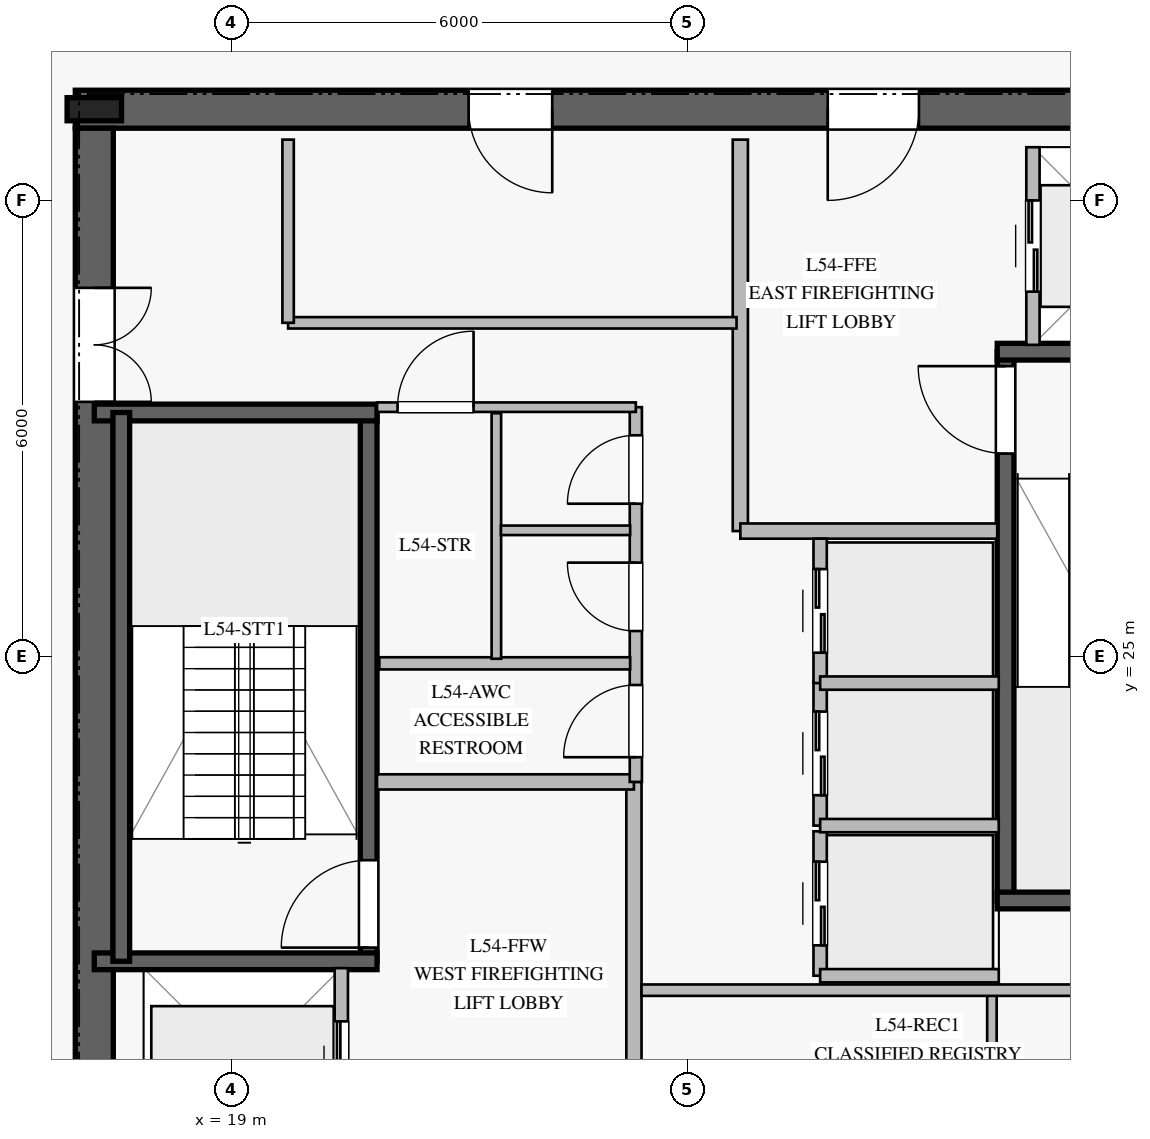
"""IFC4 building model, lengths in metres.
Left out: names, types, materials, properties, quantities, classifications, styles, units other than length and angle.
Written with IfcOpenShell. Run it as: python <this file> out.ifc"""

import sys

from ifc_helpers import new_model, si_unit, direction, frame, frame_2d, origin, origin_2d, place, context, subcontext, project, spatial, rectangle, i_section, extrude, element, fill, save


model = new_model("IFC4")
c1 = context("Model", 3, precision=1e-05, world=origin(), true_north=direction((0.0, 1.0)))
c2 = subcontext(c1, "Body", "Model", "MODEL_VIEW")
j1 = project(units=[si_unit("LENGTHUNIT", "METRE"), si_unit("PLANEANGLEUNIT", "RADIAN")], contexts=[c1])
p1 = place(None, origin())
s1 = spatial("IfcSite", under=j1, at=p1, CompositionType="ELEMENT")
p2 = place(p1, origin())
s2 = spatial("IfcBuilding", under=s1, at=p2, CompositionType="ELEMENT")
p3 = place(p2, frame((0.0, 0.0, 224.8)))
s3 = spatial("IfcBuildingStorey", under=s2, at=p3, CompositionType="ELEMENT", Elevation=224.8)
p4 = place(p3, frame((33.05, 32.2, 0.0), z_axis=(0.0, 0.0, 1.0), x_axis=(-1.0, 0.0, 0.0)))
e1 = element("IfcWall", 1, at=p4, inside=s3, PredefinedType="SHEAR", context=c2, shape_type="SweptSolid", body=[
    extrude(rectangle(XDim=16.1, YDim=0.5, at=frame_2d((8.05, 0.0))), origin(), (0.0, 0.0, 1.0), 3.78),
])
p5 = place(p4, frame((5.0, 0.0, 0.0)))
e2 = element("IfcOpeningElement", 2, at=p5, cuts=e1, PredefinedType="OPENING", context=c2, shape_type="SweptSolid", body=[
    extrude(rectangle(XDim=1.2, YDim=2.25, at=frame_2d((0.6, 1.125))), frame((0.0, 0.26, 0.0), z_axis=(0.0, -1.0, 0.0), x_axis=(1.0, 0.0, 0.0)), (0.0, 0.0, 1.0), 0.52),
])
p6 = place(p4, frame((9.825, 0.0, 0.0)))
e3 = element("IfcOpeningElement", 3, at=p6, cuts=e1, PredefinedType="OPENING", context=c2, shape_type="SweptSolid", body=[
    extrude(rectangle(XDim=1.1, YDim=2.2, at=frame_2d((0.55, 1.1))), frame((0.0, 0.26, 0.0), z_axis=(0.0, -1.0, 0.0), x_axis=(1.0, 0.0, 0.0)), (0.0, 0.0, 1.0), 0.52),
])
p7 = place(p3, frame((17.2, 31.95, 0.0), z_axis=(0.0, 0.0, 1.0), x_axis=(0.0, -1.0, 0.0)))
e4 = element("IfcWall", 4, at=p7, inside=s3, PredefinedType="SHEAR", context=c2, shape_type="SweptSolid", body=[
    extrude(rectangle(XDim=13.9, YDim=0.5, at=frame_2d((6.95, 0.0))), origin(), (0.0, 0.0, 1.0), 3.78),
])
p8 = place(p7, frame((2.1, 0.0, 0.0)))
e5 = element("IfcOpeningElement", 5, at=p8, cuts=e4, PredefinedType="OPENING", context=c2, shape_type="SweptSolid", body=[
    extrude(rectangle(XDim=1.5, YDim=2.2, at=frame_2d((0.75, 1.1))), frame((0.0, 0.26, 0.0), z_axis=(0.0, -1.0, 0.0), x_axis=(1.0, 0.0, 0.0)), (0.0, 0.0, 1.0), 0.52),
])
p9 = place(p3, frame((17.2, 32.2, 0.0), z_axis=(0.0, 0.0, 1.0), x_axis=(1.0, 0.0, 0.0)))
e6 = element("IfcColumn", 6, at=p9, inside=s3, PredefinedType="COLUMN", context=c2, shape_type="SweptSolid", body=[
    extrude(i_section(OverallWidth=0.304, OverallDepth=0.716, WebThickness=0.021, FlangeThickness=0.04, at=origin_2d()), origin(), (0.0, 0.0, 1.0), 4.0),
])
p10 = place(p3, frame((20.81, 20.99, 0.0), z_axis=(0.0, 0.0, 1.0), x_axis=(0.0, 1.0, 0.0)))
e7 = element("IfcWall", 7, at=p10, inside=s3, PredefinedType="SOLIDWALL", context=c2, shape_type="SweptSolid", body=[
    extrude(rectangle(XDim=7.22, YDim=0.22, at=frame_2d((3.61, 0.0))), origin(), (0.0, 0.0, 1.0), 3.78),
])
p11 = place(p10, frame((0.18, 0.0, 0.0)))
e8 = element("IfcOpeningElement", 8, at=p11, cuts=e7, PredefinedType="OPENING", context=c2, shape_type="SweptSolid", body=[
    extrude(rectangle(XDim=1.15, YDim=2.2, at=frame_2d((0.575, 1.1))), frame((0.0, 0.12, 0.0), z_axis=(0.0, -1.0, 0.0), x_axis=(1.0, 0.0, 0.0)), (0.0, 0.0, 1.0), 0.24),
])
for number, where, z_axis, x_axis in (
    (9, (17.2, 20.99, 0.0), (0.0, 0.0, 1.0), (1.0, 0.0, 0.0)),
    (10, (17.2, 28.21, 0.0), (0.0, 0.0, 1.0), (1.0, 0.0, 0.0)),
):
    element("IfcWall", number, at=place(p3, frame(where, z_axis=z_axis, x_axis=x_axis)), inside=s3, PredefinedType="SOLIDWALL", context=c2, shape_type="SweptSolid", body=[
        extrude(rectangle(XDim=3.72, YDim=0.22, at=frame_2d((1.86, 0.0))), origin(), (0.0, 0.0, 1.0), 3.78),
    ])
p12 = place(p3, frame((17.555, 28.21, 0.0), z_axis=(0.0, 0.0, 1.0), x_axis=(0.0, -1.0, 0.0)))
e11 = element("IfcWall", 11, at=p12, inside=s3, PredefinedType="SOLIDWALL", context=c2, shape_type="SweptSolid", body=[
    extrude(rectangle(XDim=7.22, YDim=0.22, at=frame_2d((3.61, 0.0))), origin(), (0.0, 0.0, 1.0), 3.78),
])
p13 = place(p3, frame((29.19, 21.79, 0.0), z_axis=(0.0, 0.0, 1.0), x_axis=(0.0, 1.0, 0.0)))
e12 = element("IfcWall", 12, at=p13, inside=s3, PredefinedType="SOLIDWALL", context=c2, shape_type="SweptSolid", body=[
    extrude(rectangle(XDim=7.22, YDim=0.22, at=frame_2d((3.61, 0.0))), origin(), (0.0, 0.0, 1.0), 3.78),
])
p14 = place(p13, frame((5.88, 0.0, 0.0)))
e13 = element("IfcOpeningElement", 13, at=p14, cuts=e12, PredefinedType="OPENING", context=c2, shape_type="SweptSolid", body=[
    extrude(rectangle(XDim=1.15, YDim=2.2, at=frame_2d((0.575, 1.1))), frame((0.0, 0.12, 0.0), z_axis=(0.0, -1.0, 0.0), x_axis=(1.0, 0.0, 0.0)), (0.0, 0.0, 1.0), 0.24),
])
for number, where, z_axis, x_axis in (
    (14, (29.08, 21.79, 0.0), (0.0, 0.0, 1.0), (1.0, 0.0, 0.0)),
    (15, (29.08, 29.01, 0.0), (0.0, 0.0, 1.0), (1.0, 0.0, 0.0)),
):
    element("IfcWall", number, at=place(p3, frame(where, z_axis=z_axis, x_axis=x_axis)), inside=s3, PredefinedType="SOLIDWALL", context=c2, shape_type="SweptSolid", body=[
        extrude(rectangle(XDim=3.72, YDim=0.22, at=frame_2d((1.86, 0.0))), origin(), (0.0, 0.0, 1.0), 3.78),
    ])
p15 = place(p3, frame((24.3, 18.2, 0.0), z_axis=(0.0, 0.0, 1.0), x_axis=(0.0, 1.0, 0.0)))
e16 = element("IfcWall", 16, at=p15, inside=s3, PredefinedType="PARTITIONING", context=c2, shape_type="SweptSolid", body=[
    extrude(rectangle(XDim=5.15, YDim=0.2, at=frame_2d((2.575, 0.0))), origin(), (0.0, 0.0, 1.0), 3.78),
])
p16 = place(p3, frame((20.92, 23.35, 0.0), z_axis=(0.0, 0.0, 1.0), x_axis=(1.0, 0.0, 0.0)))
e17 = element("IfcWall", 17, at=p16, inside=s3, PredefinedType="PARTITIONING", context=c2, shape_type="SweptSolid", body=[
    extrude(rectangle(XDim=3.38, YDim=0.2, at=frame_2d((1.69, 0.0))), origin(), (0.0, 0.0, 1.0), 3.78),
])
p17 = place(p3, frame((25.7, 26.65, 0.0), z_axis=(0.0, 0.0, 1.0), x_axis=(0.0, 1.0, 0.0)))
e18 = element("IfcWall", 18, at=p17, inside=s3, PredefinedType="PARTITIONING", context=c2, shape_type="SweptSolid", body=[
    extrude(rectangle(XDim=5.15, YDim=0.2, at=frame_2d((2.575, 0.0))), origin(), (0.0, 0.0, 1.0), 3.78),
])
p18 = place(p3, frame((25.7, 26.65, 0.0), z_axis=(0.0, 0.0, 1.0), x_axis=(1.0, 0.0, 0.0)))
e19 = element("IfcWall", 19, at=p18, inside=s3, PredefinedType="PARTITIONING", context=c2, shape_type="SweptSolid", body=[
    extrude(rectangle(XDim=3.38, YDim=0.2, at=frame_2d((1.69, 0.0))), origin(), (0.0, 0.0, 1.0), 3.78),
])
p19 = place(p3, frame((24.325, 23.35, 0.0), z_axis=(0.0, 0.0, 1.0), x_axis=(0.0, 1.0, 0.0)))
e20 = element("IfcWall", 20, at=p19, inside=s3, PredefinedType="PLUMBINGWALL", context=c2, shape_type="SweptSolid", body=[
    extrude(rectangle(XDim=4.93, YDim=0.16, at=frame_2d((2.465, 0.0))), origin(), (0.0, 0.0, 1.0), 3.78),
])
p20 = place(p19, frame((0.325, 0.0, 0.0)))
e21 = element("IfcOpeningElement", 21, at=p20, cuts=e20, PredefinedType="OPENING", context=c2, shape_type="SweptSolid", body=[
    extrude(rectangle(XDim=0.95, YDim=2.1, at=frame_2d((0.475, 1.05))), frame((0.0, 0.09, 0.0), z_axis=(0.0, -1.0, 0.0), x_axis=(1.0, 0.0, 0.0)), (0.0, 0.0, 1.0), 0.18),
])
p21 = place(p19, frame((1.985, 0.0, 0.0)))
e22 = element("IfcOpeningElement", 22, at=p21, cuts=e20, PredefinedType="OPENING", context=c2, shape_type="SweptSolid", body=[
    extrude(rectangle(XDim=0.9, YDim=2.1, at=frame_2d((0.45, 1.05))), frame((0.0, 0.09, 0.0), z_axis=(0.0, -1.0, 0.0), x_axis=(1.0, 0.0, 0.0)), (0.0, 0.0, 1.0), 0.18),
])
p22 = place(p19, frame((3.66, 0.0, 0.0)))
e23 = element("IfcOpeningElement", 23, at=p22, cuts=e20, PredefinedType="OPENING", context=c2, shape_type="SweptSolid", body=[
    extrude(rectangle(XDim=0.9, YDim=2.1, at=frame_2d((0.45, 1.05))), frame((0.0, 0.09, 0.0), z_axis=(0.0, -1.0, 0.0), x_axis=(1.0, 0.0, 0.0)), (0.0, 0.0, 1.0), 0.18),
])
p23 = place(p3, frame((20.92, 28.28, 0.0), z_axis=(0.0, 0.0, 1.0), x_axis=(1.0, 0.0, 0.0)))
e24 = element("IfcWall", 24, at=p23, inside=s3, PredefinedType="PARTITIONING", context=c2, shape_type="SweptSolid", body=[
    extrude(rectangle(XDim=3.405, YDim=0.125, at=frame_2d((1.703, 0.0))), origin(), (0.0, 0.0, 1.0), 3.78),
])
p24 = place(p23, frame((0.27, 0.0, 0.0)))
e25 = element("IfcOpeningElement", 25, at=p24, cuts=e24, PredefinedType="OPENING", context=c2, shape_type="SweptSolid", body=[
    extrude(rectangle(XDim=1.0, YDim=2.15, at=frame_2d((0.5, 1.075))), frame((0.0, 0.073, 0.0), z_axis=(0.0, -1.0, 0.0), x_axis=(1.0, 0.0, 0.0)), (0.0, 0.0, 1.0), 0.145),
])
p25 = place(p3, frame((29.01, 18.05, 0.0), z_axis=(0.0, 0.0, 1.0), x_axis=(0.0, 1.0, 0.0)))
e26 = element("IfcWall", 26, at=p25, inside=s3, PredefinedType="PARTITIONING", context=c2, shape_type="SweptSolid", body=[
    extrude(rectangle(XDim=2.5, YDim=0.125, at=frame_2d((1.25, 0.0))), origin(), (0.0, 0.0, 1.0), 3.78),
])
p26 = place(p3, frame((20.95, 24.91, 0.0), z_axis=(0.0, 0.0, 1.0), x_axis=(1.0, 0.0, 0.0)))
e27 = element("IfcWall", 27, at=p26, inside=s3, PredefinedType="PLUMBINGWALL", context=c2, shape_type="SweptSolid", body=[
    extrude(rectangle(XDim=3.3, YDim=0.16, at=frame_2d((1.65, 0.0))), origin(), (0.0, 0.0, 1.0), 3.78),
])
p27 = place(p3, frame((22.49, 24.97, 0.0), z_axis=(0.0, 0.0, 1.0), x_axis=(0.0, 1.0, 0.0)))
e28 = element("IfcWall", 28, at=p27, inside=s3, PredefinedType="PARTITIONING", context=c2, shape_type="SweptSolid", body=[
    extrude(rectangle(XDim=3.23, YDim=0.125, at=frame_2d((1.615, 0.0))), origin(), (0.0, 0.0, 1.0), 3.78),
])
p28 = place(p3, frame((22.55, 26.66, 0.0), z_axis=(0.0, 0.0, 1.0), x_axis=(1.0, 0.0, 0.0)))
e29 = element("IfcWall", 29, at=p28, inside=s3, PredefinedType="PARTITIONING", context=c2, shape_type="SweptSolid", body=[
    extrude(rectangle(XDim=1.7, YDim=0.125, at=frame_2d((0.85, 0.0))), origin(), (0.0, 0.0, 1.0), 3.78),
])
p29 = place(p3, frame((24.4, 20.61, 0.0), z_axis=(0.0, 0.0, 1.0), x_axis=(1.0, 0.0, 0.0)))
e30 = element("IfcWall", 30, at=p29, inside=s3, PredefinedType="PARTITIONING", context=c2, shape_type="SweptSolid", body=[
    extrude(rectangle(XDim=5.9, YDim=0.15, at=frame_2d((2.95, 0.0))), origin(), (0.0, 0.0, 1.0), 3.78),
])
p30 = place(p3, frame((19.75, 29.39, 0.0), z_axis=(0.0, 0.0, 1.0), x_axis=(1.0, 0.0, 0.0)))
e31 = element("IfcWall", 31, at=p30, inside=s3, PredefinedType="PARTITIONING", context=c2, shape_type="SweptSolid", body=[
    extrude(rectangle(XDim=5.9, YDim=0.15, at=frame_2d((2.95, 0.0))), origin(), (0.0, 0.0, 1.0), 3.78),
])
p31 = place(p3, frame((19.75, 29.39, 0.0), z_axis=(0.0, 0.0, 1.0), x_axis=(0.0, 1.0, 0.0)))
e32 = element("IfcWall", 32, at=p31, inside=s3, PredefinedType="PARTITIONING", context=c2, shape_type="SweptSolid", body=[
    extrude(rectangle(XDim=2.41, YDim=0.15, at=frame_2d((1.205, 0.0))), origin(), (0.0, 0.0, 1.0), 3.78),
])
p32 = place(p3, frame((26.75, 20.8, 0.0), z_axis=(0.0, 0.0, 1.0), x_axis=(0.0, 1.0, 0.0)))
e33 = element("IfcWall", 33, at=p32, inside=s3, PredefinedType="PARTITIONING", context=c2, shape_type="SweptSolid", body=[
    extrude(rectangle(XDim=1.9, YDim=0.175, at=frame_2d((0.95, 0.0))), origin(), (0.0, 0.0, 1.0), 3.78),
])
p33 = place(p32, frame((0.4, 0.0, 0.0)))
e34 = element("IfcOpeningElement", 34, at=p33, cuts=e33, PredefinedType="OPENING", context=c2, shape_type="SweptSolid", body=[
    extrude(rectangle(XDim=1.1, YDim=2.2, at=frame_2d((0.55, 1.1))), frame((0.0, 0.098, 0.0), z_axis=(0.0, -1.0, 0.0), x_axis=(1.0, 0.0, 0.0)), (0.0, 0.0, 1.0), 0.195),
])
p34 = place(p3, frame((26.75, 20.8, 0.0), z_axis=(0.0, 0.0, 1.0), x_axis=(1.0, 0.0, 0.0)))
e35 = element("IfcWall", 35, at=p34, inside=s3, PredefinedType="PARTITIONING", context=c2, shape_type="SweptSolid", body=[
    extrude(rectangle(XDim=2.35, YDim=0.175, at=frame_2d((1.175, 0.0))), origin(), (0.0, 0.0, 1.0), 3.78),
])
p35 = place(p3, frame((26.75, 22.775, 0.0), z_axis=(0.0, 0.0, 1.0), x_axis=(0.0, 1.0, 0.0)))
e36 = element("IfcWall", 36, at=p35, inside=s3, PredefinedType="PARTITIONING", context=c2, shape_type="SweptSolid", body=[
    extrude(rectangle(XDim=1.9, YDim=0.175, at=frame_2d((0.95, 0.0))), origin(), (0.0, 0.0, 1.0), 3.78),
])
p36 = place(p35, frame((0.4, 0.0, 0.0)))
e37 = element("IfcOpeningElement", 37, at=p36, cuts=e36, PredefinedType="OPENING", context=c2, shape_type="SweptSolid", body=[
    extrude(rectangle(XDim=1.1, YDim=2.2, at=frame_2d((0.55, 1.1))), frame((0.0, 0.098, 0.0), z_axis=(0.0, -1.0, 0.0), x_axis=(1.0, 0.0, 0.0)), (0.0, 0.0, 1.0), 0.195),
])
p37 = place(p3, frame((26.75, 22.775, 0.0), z_axis=(0.0, 0.0, 1.0), x_axis=(1.0, 0.0, 0.0)))
e38 = element("IfcWall", 38, at=p37, inside=s3, PredefinedType="PARTITIONING", context=c2, shape_type="SweptSolid", body=[
    extrude(rectangle(XDim=2.35, YDim=0.175, at=frame_2d((1.175, 0.0))), origin(), (0.0, 0.0, 1.0), 3.78),
])
p38 = place(p3, frame((26.75, 24.65, 0.0), z_axis=(0.0, 0.0, 1.0), x_axis=(0.0, 1.0, 0.0)))
e39 = element("IfcWall", 39, at=p38, inside=s3, PredefinedType="PARTITIONING", context=c2, shape_type="SweptSolid", body=[
    extrude(rectangle(XDim=1.9, YDim=0.175, at=frame_2d((0.95, 0.0))), origin(), (0.0, 0.0, 1.0), 3.78),
])
p39 = place(p38, frame((0.4, 0.0, 0.0)))
e40 = element("IfcOpeningElement", 40, at=p39, cuts=e39, PredefinedType="OPENING", context=c2, shape_type="SweptSolid", body=[
    extrude(rectangle(XDim=1.1, YDim=2.2, at=frame_2d((0.55, 1.1))), frame((0.0, 0.098, 0.0), z_axis=(0.0, -1.0, 0.0), x_axis=(1.0, 0.0, 0.0)), (0.0, 0.0, 1.0), 0.195),
])
p40 = place(p3, frame((26.75, 24.65, 0.0), z_axis=(0.0, 0.0, 1.0), x_axis=(1.0, 0.0, 0.0)))
e41 = element("IfcWall", 41, at=p40, inside=s3, PredefinedType="PARTITIONING", context=c2, shape_type="SweptSolid", body=[
    extrude(rectangle(XDim=2.35, YDim=0.175, at=frame_2d((1.175, 0.0))), origin(), (0.0, 0.0, 1.0), 3.78),
])
p41 = place(p3, frame((20.45, 18.3, 0.0), z_axis=(0.0, 0.0, 1.0), x_axis=(0.0, 1.0, 0.0)))
e42 = element("IfcWall", 42, at=p41, inside=s3, PredefinedType="PARTITIONING", context=c2, shape_type="SweptSolid", body=[
    extrude(rectangle(XDim=2.6, YDim=0.175, at=frame_2d((1.3, 0.0))), origin(), (0.0, 0.0, 1.0), 3.78),
])
p42 = place(p41, frame((0.7, 0.0, 0.0)))
e43 = element("IfcOpeningElement", 43, at=p42, cuts=e42, PredefinedType="OPENING", context=c2, shape_type="SweptSolid", body=[
    extrude(rectangle(XDim=1.2, YDim=2.2, at=frame_2d((0.6, 1.1))), frame((0.0, 0.098, 0.0), z_axis=(0.0, -1.0, 0.0), x_axis=(1.0, 0.0, 0.0)), (0.0, 0.0, 1.0), 0.195),
])
p43 = place(p3, frame((29.55, 29.1, 0.0), z_axis=(0.0, 0.0, 1.0), x_axis=(0.0, 1.0, 0.0)))
e44 = element("IfcWall", 44, at=p43, inside=s3, PredefinedType="PARTITIONING", context=c2, shape_type="SweptSolid", body=[
    extrude(rectangle(XDim=2.6, YDim=0.175, at=frame_2d((1.3, 0.0))), origin(), (0.0, 0.0, 1.0), 3.78),
])
p44 = place(p43, frame((0.7, 0.0, 0.0)))
e45 = element("IfcOpeningElement", 45, at=p44, cuts=e44, PredefinedType="OPENING", context=c2, shape_type="SweptSolid", body=[
    extrude(rectangle(XDim=1.2, YDim=2.2, at=frame_2d((0.6, 1.1))), frame((0.0, 0.098, 0.0), z_axis=(0.0, -1.0, 0.0), x_axis=(1.0, 0.0, 0.0)), (0.0, 0.0, 1.0), 0.195),
])
p45 = place(p11, origin())
e46 = element("IfcDoor", 46, at=p45, inside=s3, OperationType="SINGLE_SWING_LEFT", PredefinedType="DOOR", context=c2, shape_type="SweptSolid", body=[
    extrude(rectangle(XDim=1.15, YDim=2.2, at=frame_2d((0.575, 1.1))), frame((0.0, 0.025, 0.0), z_axis=(0.0, -1.0, 0.0), x_axis=(1.0, 0.0, 0.0)), (0.0, 0.0, 1.0), 0.05),
])
fill(e8, e46)
p46 = place(p14, origin())
e47 = element("IfcDoor", 47, at=p46, inside=s3, OperationType="SINGLE_SWING_RIGHT", PredefinedType="DOOR", context=c2, shape_type="SweptSolid", body=[
    extrude(rectangle(XDim=1.15, YDim=2.2, at=frame_2d((0.575, 1.1))), frame((0.0, 0.025, 0.0), z_axis=(0.0, -1.0, 0.0), x_axis=(1.0, 0.0, 0.0)), (0.0, 0.0, 1.0), 0.05),
])
fill(e13, e47)
p47 = place(p5, origin())
e48 = element("IfcDoor", 48, at=p47, inside=s3, OperationType="SINGLE_SWING_RIGHT", PredefinedType="DOOR", context=c2, shape_type="SweptSolid", body=[
    extrude(rectangle(XDim=1.2, YDim=2.25, at=frame_2d((0.6, 1.125))), frame((0.0, 0.025, 0.0), z_axis=(0.0, -1.0, 0.0), x_axis=(1.0, 0.0, 0.0)), (0.0, 0.0, 1.0), 0.05),
])
fill(e2, e48)
p48 = place(p8, origin())
e49 = element("IfcDoor", 49, at=p48, inside=s3, OperationType="DOUBLE_DOOR_SINGLE_SWING", PredefinedType="DOOR", context=c2, shape_type="SweptSolid", body=[
    extrude(rectangle(XDim=1.5, YDim=2.2, at=frame_2d((0.75, 1.1))), frame((0.0, 0.025, 0.0), z_axis=(0.0, -1.0, 0.0), x_axis=(1.0, 0.0, 0.0)), (0.0, 0.0, 1.0), 0.05),
])
fill(e5, e49)
p49 = place(p20, origin())
e50 = element("IfcDoor", 50, at=p49, inside=s3, OperationType="SINGLE_SWING_LEFT", PredefinedType="DOOR", context=c2, shape_type="SweptSolid", body=[
    extrude(rectangle(XDim=0.95, YDim=2.1, at=frame_2d((0.475, 1.05))), frame((0.0, 0.025, 0.0), z_axis=(0.0, -1.0, 0.0), x_axis=(1.0, 0.0, 0.0)), (0.0, 0.0, 1.0), 0.05),
])
fill(e21, e50)
p50 = place(p21, origin())
e51 = element("IfcDoor", 51, at=p50, inside=s3, OperationType="SINGLE_SWING_RIGHT", PredefinedType="DOOR", context=c2, shape_type="SweptSolid", body=[
    extrude(rectangle(XDim=0.9, YDim=2.1, at=frame_2d((0.45, 1.05))), frame((0.0, 0.025, 0.0), z_axis=(0.0, -1.0, 0.0), x_axis=(1.0, 0.0, 0.0)), (0.0, 0.0, 1.0), 0.05),
])
fill(e22, e51)
p51 = place(p22, origin())
e52 = element("IfcDoor", 52, at=p51, inside=s3, OperationType="SINGLE_SWING_LEFT", PredefinedType="DOOR", context=c2, shape_type="SweptSolid", body=[
    extrude(rectangle(XDim=0.9, YDim=2.1, at=frame_2d((0.45, 1.05))), frame((0.0, 0.025, 0.0), z_axis=(0.0, -1.0, 0.0), x_axis=(1.0, 0.0, 0.0)), (0.0, 0.0, 1.0), 0.05),
])
fill(e23, e52)
p52 = place(p24, origin())
e53 = element("IfcDoor", 53, at=p52, inside=s3, OperationType="SINGLE_SWING_RIGHT", PredefinedType="DOOR", context=c2, shape_type="SweptSolid", body=[
    extrude(rectangle(XDim=1.0, YDim=2.15, at=frame_2d((0.5, 1.075))), frame((0.0, 0.025, 0.0), z_axis=(0.0, -1.0, 0.0), x_axis=(1.0, 0.0, 0.0)), (0.0, 0.0, 1.0), 0.05),
])
fill(e25, e53)
p53 = place(p6, origin())
e54 = element("IfcDoor", 54, at=p53, inside=s3, OperationType="SINGLE_SWING_LEFT", PredefinedType="DOOR", context=c2, shape_type="SweptSolid", body=[
    extrude(rectangle(XDim=1.1, YDim=2.2, at=frame_2d((0.55, 1.1))), frame((0.0, 0.025, 0.0), z_axis=(0.0, -1.0, 0.0), x_axis=(1.0, 0.0, 0.0)), (0.0, 0.0, 1.0), 0.05),
])
fill(e3, e54)
p54 = place(p33, origin())
e55 = element("IfcDoor", 55, at=p54, inside=s3, OperationType="DOUBLE_DOOR_SLIDING", PredefinedType="DOOR", context=c2, shape_type="SweptSolid", body=[
    extrude(rectangle(XDim=1.1, YDim=2.2, at=frame_2d((0.55, 1.1))), frame((0.0, 0.025, 0.0), z_axis=(0.0, -1.0, 0.0), x_axis=(1.0, 0.0, 0.0)), (0.0, 0.0, 1.0), 0.05),
])
fill(e34, e55)
p55 = place(p36, origin())
e56 = element("IfcDoor", 56, at=p55, inside=s3, OperationType="DOUBLE_DOOR_SLIDING", PredefinedType="DOOR", context=c2, shape_type="SweptSolid", body=[
    extrude(rectangle(XDim=1.1, YDim=2.2, at=frame_2d((0.55, 1.1))), frame((0.0, 0.025, 0.0), z_axis=(0.0, -1.0, 0.0), x_axis=(1.0, 0.0, 0.0)), (0.0, 0.0, 1.0), 0.05),
])
fill(e37, e56)
p56 = place(p39, origin())
e57 = element("IfcDoor", 57, at=p56, inside=s3, OperationType="DOUBLE_DOOR_SLIDING", PredefinedType="DOOR", context=c2, shape_type="SweptSolid", body=[
    extrude(rectangle(XDim=1.1, YDim=2.2, at=frame_2d((0.55, 1.1))), frame((0.0, 0.025, 0.0), z_axis=(0.0, -1.0, 0.0), x_axis=(1.0, 0.0, 0.0)), (0.0, 0.0, 1.0), 0.05),
])
fill(e40, e57)
p57 = place(p42, origin())
e58 = element("IfcDoor", 58, at=p57, inside=s3, OperationType="DOUBLE_DOOR_SLIDING", PredefinedType="DOOR", context=c2, shape_type="SweptSolid", body=[
    extrude(rectangle(XDim=1.2, YDim=2.2, at=frame_2d((0.6, 1.1))), frame((0.0, 0.025, 0.0), z_axis=(0.0, -1.0, 0.0), x_axis=(1.0, 0.0, 0.0)), (0.0, 0.0, 1.0), 0.05),
])
fill(e43, e58)
p58 = place(p44, origin())
e59 = element("IfcDoor", 59, at=p58, inside=s3, OperationType="DOUBLE_DOOR_SLIDING", PredefinedType="DOOR", context=c2, shape_type="SweptSolid", body=[
    extrude(rectangle(XDim=1.2, YDim=2.2, at=frame_2d((0.6, 1.1))), frame((0.0, 0.025, 0.0), z_axis=(0.0, -1.0, 0.0), x_axis=(1.0, 0.0, 0.0)), (0.0, 0.0, 1.0), 0.05),
])
fill(e45, e59)
save(model, sys.argv[1])
